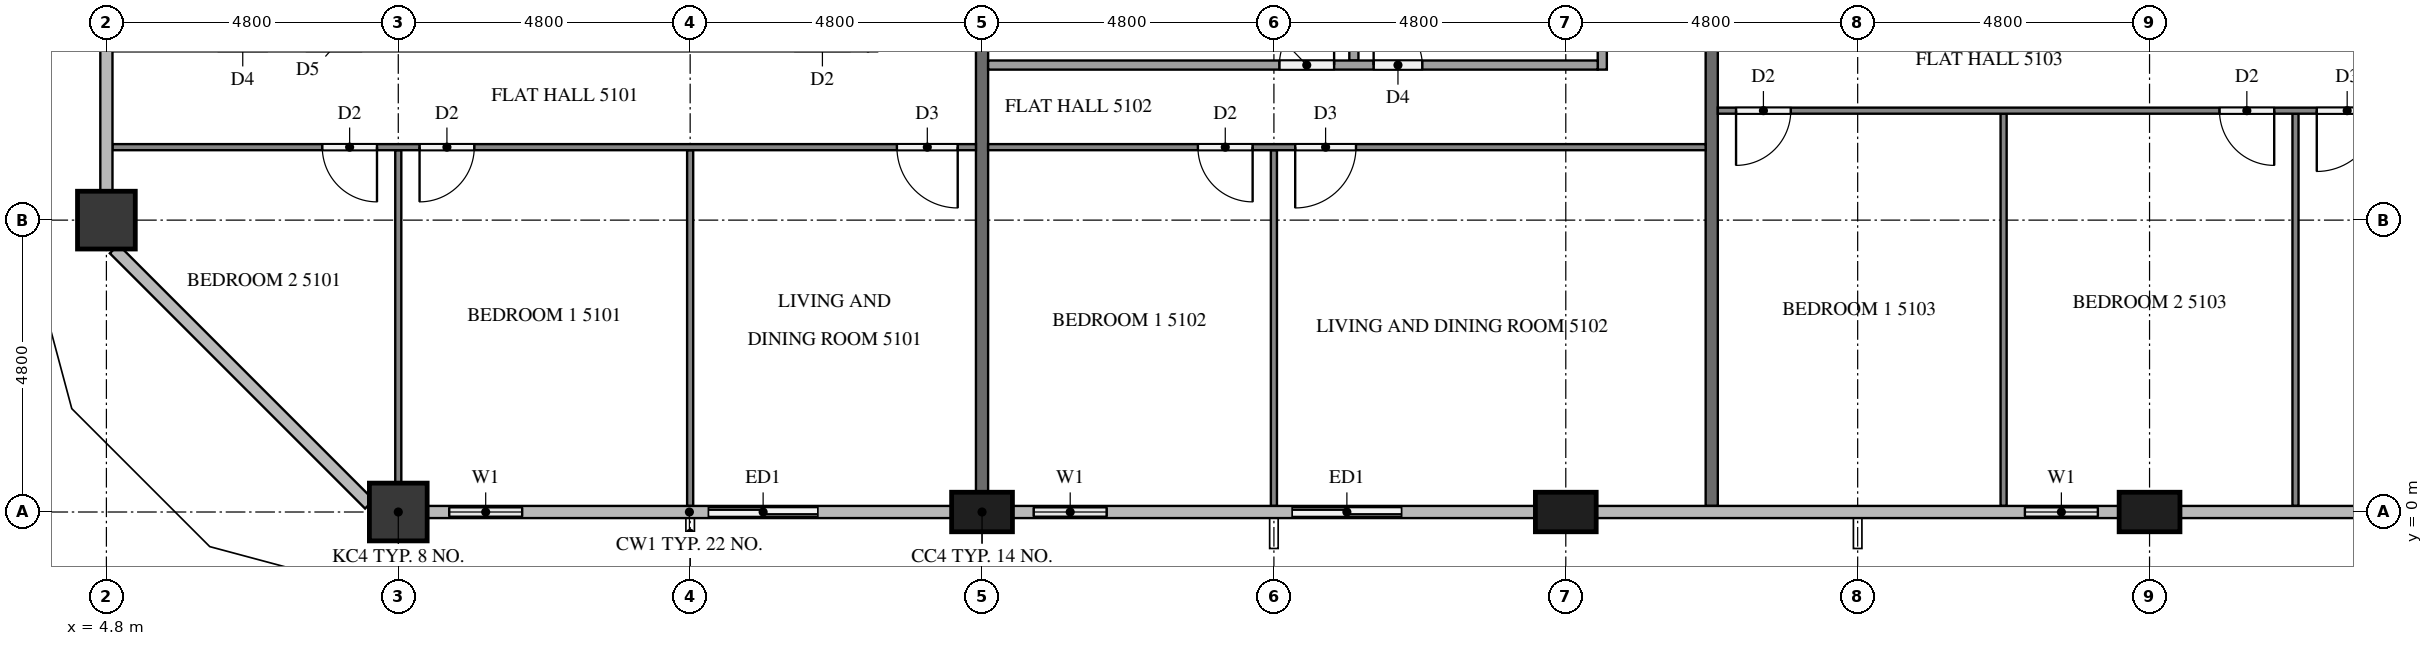
"""IFC4 building model, lengths in metres.
Left out: names, types, materials, properties, quantities, classifications, styles, units other than length and angle.
Written with IfcOpenShell. Run it as: python <this file> out.ifc"""

import sys

from ifc_helpers import new_model, si_unit, direction, frame, frame_2d, origin, origin_2d, place, context, subcontext, project, spatial, rectangle, extrude, element, fill, save


model = new_model("IFC4")
c1 = context("Model", 3, precision=1e-05, world=origin(), true_north=direction((0.0, 1.0)))
c2 = subcontext(c1, "Body", "Model", "MODEL_VIEW")
j1 = project(units=[si_unit("LENGTHUNIT", "METRE"), si_unit("PLANEANGLEUNIT", "RADIAN")], contexts=[c1])
p1 = place(None, origin())
s1 = spatial("IfcSite", under=j1, at=p1, CompositionType="ELEMENT")
p2 = place(p1, origin())
s2 = spatial("IfcBuilding", under=s1, at=p2, CompositionType="ELEMENT")
p3 = place(p2, frame((0.0, 0.0, 196.4)))
s3 = spatial("IfcBuildingStorey", under=s2, at=p3, CompositionType="ELEMENT", Elevation=196.4)
p4 = place(p3, frame((9.6, 0.0, 0.0), z_axis=(0.0, 0.0, 1.0), x_axis=(1.0, 0.0, 0.0)))
e1 = element("IfcColumn", 1, at=p4, inside=s3, PredefinedType="COLUMN", context=c2, shape_type="SweptSolid", body=[
    extrude(rectangle(XDim=0.95, YDim=0.95, at=origin_2d()), origin(), (0.0, 0.0, 1.0), 3.2),
])
for number, where, z_axis, x_axis in (
    (2, (19.2, 0.0, 0.0), (0.0, 0.0, 1.0), (1.0, 0.0, 0.0)),
    (3, (28.8, 0.0, 0.0), (0.0, 0.0, 1.0), (1.0, 0.0, 0.0)),
    (4, (38.4, 0.0, 0.0), (0.0, 0.0, 1.0), (1.0, 0.0, 0.0)),
):
    element("IfcColumn", number, at=place(p3, frame(where, z_axis=z_axis, x_axis=x_axis)), inside=s3, PredefinedType="COLUMN", context=c2, shape_type="SweptSolid", body=[
        extrude(rectangle(XDim=1.0, YDim=0.65, at=origin_2d()), origin(), (0.0, 0.0, 1.0), 3.2),
    ])
p5 = place(p3, frame((4.8, 4.8, 0.0), z_axis=(0.0, 0.0, 1.0), x_axis=(1.0, 0.0, 0.0)))
e5 = element("IfcColumn", 5, at=p5, inside=s3, PredefinedType="COLUMN", context=c2, shape_type="SweptSolid", body=[
    extrude(rectangle(XDim=0.95, YDim=0.95, at=origin_2d()), origin(), (0.0, 0.0, 1.0), 3.2),
])
p6 = place(p3, frame((10.075, 0.0, 0.0), z_axis=(0.0, 0.0, 1.0), x_axis=(1.0, 0.0, 0.0)))
e6 = element("IfcWall", 6, at=p6, inside=s3, PredefinedType="SOLIDWALL", context=c2, shape_type="SweptSolid", body=[
    extrude(rectangle(XDim=1.925, YDim=0.15, at=frame_2d((0.962, 0.0))), origin(), (0.0, 0.0, 1.0), 3.2),
])
p7 = place(p6, frame((0.363, 0.0, 0.9)))
e7 = element("IfcOpeningElement", 7, at=p7, cuts=e6, PredefinedType="OPENING", context=c2, shape_type="SweptSolid", body=[
    extrude(rectangle(XDim=1.2, YDim=1.4, at=frame_2d((0.6, 0.7))), frame((0.0, 0.085, 0.0), z_axis=(0.0, -1.0, 0.0), x_axis=(1.0, 0.0, 0.0)), (0.0, 0.0, 1.0), 0.17),
])
p8 = place(p3, frame((14.4, 0.0, 0.0), z_axis=(0.0, 0.0, 1.0), x_axis=(1.0, 0.0, 0.0)))
e8 = element("IfcWall", 8, at=p8, inside=s3, PredefinedType="SOLIDWALL", context=c2, shape_type="SweptSolid", body=[
    extrude(rectangle(XDim=2.4, YDim=0.15, at=frame_2d((1.2, 0.0))), origin(), (0.0, 0.0, 1.0), 3.2),
])
p9 = place(p8, frame((0.3, 0.0, 0.0)))
e9 = element("IfcOpeningElement", 9, at=p9, cuts=e8, PredefinedType="OPENING", context=c2, shape_type="SweptSolid", body=[
    extrude(rectangle(XDim=1.8, YDim=2.4, at=frame_2d((0.9, 1.2))), frame((0.0, 0.085, 0.0), z_axis=(0.0, -1.0, 0.0), x_axis=(1.0, 0.0, 0.0)), (0.0, 0.0, 1.0), 0.17),
])
p10 = place(p3, frame((19.7, 0.0, 0.0), z_axis=(0.0, 0.0, 1.0), x_axis=(1.0, 0.0, 0.0)))
e10 = element("IfcWall", 10, at=p10, inside=s3, PredefinedType="SOLIDWALL", context=c2, shape_type="SweptSolid", body=[
    extrude(rectangle(XDim=1.9, YDim=0.15, at=frame_2d((0.95, 0.0))), origin(), (0.0, 0.0, 1.0), 3.2),
])
p11 = place(p10, frame((0.35, 0.0, 0.9)))
e11 = element("IfcOpeningElement", 11, at=p11, cuts=e10, PredefinedType="OPENING", context=c2, shape_type="SweptSolid", body=[
    extrude(rectangle(XDim=1.2, YDim=1.4, at=frame_2d((0.6, 0.7))), frame((0.0, 0.085, 0.0), z_axis=(0.0, -1.0, 0.0), x_axis=(1.0, 0.0, 0.0)), (0.0, 0.0, 1.0), 0.17),
])
p12 = place(p3, frame((24.0, 0.0, 0.0), z_axis=(0.0, 0.0, 1.0), x_axis=(1.0, 0.0, 0.0)))
e12 = element("IfcWall", 12, at=p12, inside=s3, PredefinedType="SOLIDWALL", context=c2, shape_type="SweptSolid", body=[
    extrude(rectangle(XDim=2.4, YDim=0.15, at=frame_2d((1.2, 0.0))), origin(), (0.0, 0.0, 1.0), 3.2),
])
p13 = place(p12, frame((0.3, 0.0, 0.0)))
e13 = element("IfcOpeningElement", 13, at=p13, cuts=e12, PredefinedType="OPENING", context=c2, shape_type="SweptSolid", body=[
    extrude(rectangle(XDim=1.8, YDim=2.4, at=frame_2d((0.9, 1.2))), frame((0.0, 0.085, 0.0), z_axis=(0.0, -1.0, 0.0), x_axis=(1.0, 0.0, 0.0)), (0.0, 0.0, 1.0), 0.17),
])
p14 = place(p3, frame((36.0, 0.0, 0.0), z_axis=(0.0, 0.0, 1.0), x_axis=(1.0, 0.0, 0.0)))
e14 = element("IfcWall", 14, at=p14, inside=s3, PredefinedType="SOLIDWALL", context=c2, shape_type="SweptSolid", body=[
    extrude(rectangle(XDim=1.9, YDim=0.15, at=frame_2d((0.95, 0.0))), origin(), (0.0, 0.0, 1.0), 3.2),
])
p15 = place(p14, frame((0.35, 0.0, 0.9)))
e15 = element("IfcOpeningElement", 15, at=p15, cuts=e14, PredefinedType="OPENING", context=c2, shape_type="SweptSolid", body=[
    extrude(rectangle(XDim=1.2, YDim=1.4, at=frame_2d((0.6, 0.7))), frame((0.0, 0.085, 0.0), z_axis=(0.0, -1.0, 0.0), x_axis=(1.0, 0.0, 0.0)), (0.0, 0.0, 1.0), 0.17),
])
p16 = place(p3, frame((19.2, 11.9, 0.0), z_axis=(0.0, 0.0, 1.0), x_axis=(0.0, -1.0, 0.0)))
e16 = element("IfcWall", 16, at=p16, inside=s3, PredefinedType="PARTITIONING", context=c2, shape_type="SweptSolid", body=[
    extrude(rectangle(XDim=11.575, YDim=0.2, at=frame_2d((5.788, 0.0))), origin(), (0.0, 0.0, 1.0), 3.2),
])
p17 = place(p3, frame((31.2, 11.9, 0.0), z_axis=(0.0, 0.0, 1.0), x_axis=(0.0, -1.0, 0.0)))
e17 = element("IfcWall", 17, at=p17, inside=s3, PredefinedType="PARTITIONING", context=c2, shape_type="SweptSolid", body=[
    extrude(rectangle(XDim=11.8, YDim=0.2, at=frame_2d((5.9, 0.0))), origin(), (0.0, 0.0, 1.0), 3.2),
])
p18 = place(p3, frame((14.4, 5.95, 0.0), z_axis=(0.0, 0.0, 1.0), x_axis=(0.0, -1.0, 0.0)))
e18 = element("IfcWall", 18, at=p18, inside=s3, PredefinedType="PARTITIONING", context=c2, shape_type="SweptSolid", body=[
    extrude(rectangle(XDim=5.85, YDim=0.1, at=frame_2d((2.925, 0.0))), origin(), (0.0, 0.0, 1.0), 3.2),
])
p19 = place(p3, frame((9.6, 5.95, 0.0), z_axis=(0.0, 0.0, 1.0), x_axis=(0.0, -1.0, 0.0)))
e19 = element("IfcWall", 19, at=p19, inside=s3, PredefinedType="PARTITIONING", context=c2, shape_type="SweptSolid", body=[
    extrude(rectangle(XDim=5.475, YDim=0.1, at=frame_2d((2.737, 0.0))), origin(), (0.0, 0.0, 1.0), 3.2),
])
p20 = place(p3, frame((19.1, 6.0, 0.0), z_axis=(0.0, 0.0, 1.0), x_axis=(-1.0, 0.0, 0.0)))
e20 = element("IfcWall", 20, at=p20, inside=s3, PredefinedType="PARTITIONING", context=c2, shape_type="SweptSolid", body=[
    extrude(rectangle(XDim=14.2, YDim=0.1, at=frame_2d((7.1, 0.0))), origin(), (0.0, 0.0, 1.0), 3.2),
])
p21 = place(p20, frame((0.3, 0.0, 0.0)))
e21 = element("IfcOpeningElement", 21, at=p21, cuts=e20, PredefinedType="OPENING", context=c2, shape_type="SweptSolid", body=[
    extrude(rectangle(XDim=1.0, YDim=2.1, at=frame_2d((0.5, 1.05))), frame((0.0, 0.06, 0.0), z_axis=(0.0, -1.0, 0.0), x_axis=(1.0, 0.0, 0.0)), (0.0, 0.0, 1.0), 0.12),
])
p22 = place(p20, frame((8.25, 0.0, 0.0)))
e22 = element("IfcOpeningElement", 22, at=p22, cuts=e20, PredefinedType="OPENING", context=c2, shape_type="SweptSolid", body=[
    extrude(rectangle(XDim=0.9, YDim=2.1, at=frame_2d((0.45, 1.05))), frame((0.0, 0.06, 0.0), z_axis=(0.0, -1.0, 0.0), x_axis=(1.0, 0.0, 0.0)), (0.0, 0.0, 1.0), 0.12),
])
p23 = place(p20, frame((9.85, 0.0, 0.0)))
e23 = element("IfcOpeningElement", 23, at=p23, cuts=e20, PredefinedType="OPENING", context=c2, shape_type="SweptSolid", body=[
    extrude(rectangle(XDim=0.9, YDim=2.1, at=frame_2d((0.45, 1.05))), frame((0.0, 0.06, 0.0), z_axis=(0.0, -1.0, 0.0), x_axis=(1.0, 0.0, 0.0)), (0.0, 0.0, 1.0), 0.12),
])
p24 = place(p3, frame((24.0, 5.95, 0.0), z_axis=(0.0, 0.0, 1.0), x_axis=(0.0, -1.0, 0.0)))
e24 = element("IfcWall", 24, at=p24, inside=s3, PredefinedType="PARTITIONING", context=c2, shape_type="SweptSolid", body=[
    extrude(rectangle(XDim=5.85, YDim=0.1, at=frame_2d((2.925, 0.0))), origin(), (0.0, 0.0, 1.0), 3.2),
])
p25 = place(p3, frame((31.1, 6.0, 0.0), z_axis=(0.0, 0.0, 1.0), x_axis=(-1.0, 0.0, 0.0)))
e25 = element("IfcWall", 25, at=p25, inside=s3, PredefinedType="PARTITIONING", context=c2, shape_type="SweptSolid", body=[
    extrude(rectangle(XDim=11.8, YDim=0.1, at=frame_2d((5.9, 0.0))), origin(), (0.0, 0.0, 1.0), 3.2),
])
p26 = place(p25, frame((5.75, 0.0, 0.0)))
e26 = element("IfcOpeningElement", 26, at=p26, cuts=e25, PredefinedType="OPENING", context=c2, shape_type="SweptSolid", body=[
    extrude(rectangle(XDim=1.0, YDim=2.1, at=frame_2d((0.5, 1.05))), frame((0.0, 0.06, 0.0), z_axis=(0.0, -1.0, 0.0), x_axis=(1.0, 0.0, 0.0)), (0.0, 0.0, 1.0), 0.12),
])
p27 = place(p25, frame((7.45, 0.0, 0.0)))
e27 = element("IfcOpeningElement", 27, at=p27, cuts=e25, PredefinedType="OPENING", context=c2, shape_type="SweptSolid", body=[
    extrude(rectangle(XDim=0.9, YDim=2.1, at=frame_2d((0.45, 1.05))), frame((0.0, 0.06, 0.0), z_axis=(0.0, -1.0, 0.0), x_axis=(1.0, 0.0, 0.0)), (0.0, 0.0, 1.0), 0.12),
])
p28 = place(p3, frame((25.315, 11.9, 0.0), z_axis=(0.0, 0.0, 1.0), x_axis=(0.0, -1.0, 0.0)))
e28 = element("IfcWall", 28, at=p28, inside=s3, PredefinedType="PARTITIONING", context=c2, shape_type="SweptSolid", body=[
    extrude(rectangle(XDim=4.475, YDim=0.15, at=frame_2d((2.237, 0.0))), origin(), (0.0, 0.0, 1.0), 3.2),
])
p29 = place(p3, frame((29.4, 11.9, 0.0), z_axis=(0.0, 0.0, 1.0), x_axis=(0.0, -1.0, 0.0)))
e29 = element("IfcWall", 29, at=p29, inside=s3, PredefinedType="PARTITIONING", context=c2, shape_type="SweptSolid", body=[
    extrude(rectangle(XDim=4.625, YDim=0.15, at=frame_2d((2.312, 0.0))), origin(), (0.0, 0.0, 1.0), 3.2),
])
p30 = place(p3, frame((19.3, 7.35, 0.0), z_axis=(0.0, 0.0, 1.0), x_axis=(1.0, 0.0, 0.0)))
e30 = element("IfcWall", 30, at=p30, inside=s3, PredefinedType="PARTITIONING", context=c2, shape_type="SweptSolid", body=[
    extrude(rectangle(XDim=10.025, YDim=0.15, at=frame_2d((5.012, 0.0))), origin(), (0.0, 0.0, 1.0), 3.2),
])
p31 = place(p30, frame((6.34, 0.0, 0.0)))
e31 = element("IfcOpeningElement", 31, at=p31, cuts=e30, PredefinedType="OPENING", context=c2, shape_type="SweptSolid", body=[
    extrude(rectangle(XDim=0.8, YDim=2.1, at=frame_2d((0.4, 1.05))), frame((0.0, 0.085, 0.0), z_axis=(0.0, -1.0, 0.0), x_axis=(1.0, 0.0, 0.0)), (0.0, 0.0, 1.0), 0.17),
])
p32 = place(p30, frame((4.79, 0.0, 0.0)))
e32 = element("IfcOpeningElement", 32, at=p32, cuts=e30, PredefinedType="OPENING", context=c2, shape_type="SweptSolid", body=[
    extrude(rectangle(XDim=0.9, YDim=2.1, at=frame_2d((0.45, 1.05))), frame((0.0, 0.085, 0.0), z_axis=(0.0, -1.0, 0.0), x_axis=(1.0, 0.0, 0.0)), (0.0, 0.0, 1.0), 0.17),
])
for number, where, z_axis, x_axis in (
    (33, (36.0, 6.55, 0.0), (0.0, 0.0, 1.0), (0.0, -1.0, 0.0)),
    (34, (40.8, 6.55, 0.0), (0.0, 0.0, 1.0), (0.0, -1.0, 0.0)),
):
    element("IfcWall", number, at=place(p3, frame(where, z_axis=z_axis, x_axis=x_axis)), inside=s3, PredefinedType="PARTITIONING", context=c2, shape_type="SweptSolid", body=[
        extrude(rectangle(XDim=6.45, YDim=0.1, at=frame_2d((3.225, 0.0))), origin(), (0.0, 0.0, 1.0), 3.2),
    ])
p33 = place(p3, frame((45.5, 6.6, 0.0), z_axis=(0.0, 0.0, 1.0), x_axis=(-1.0, 0.0, 0.0)))
e35 = element("IfcWall", 35, at=p33, inside=s3, PredefinedType="PARTITIONING", context=c2, shape_type="SweptSolid", body=[
    extrude(rectangle(XDim=14.2, YDim=0.1, at=frame_2d((7.1, 0.0))), origin(), (0.0, 0.0, 1.0), 3.2),
])
p34 = place(p33, frame((13.0, 0.0, 0.0)))
e36 = element("IfcOpeningElement", 36, at=p34, cuts=e35, PredefinedType="OPENING", context=c2, shape_type="SweptSolid", body=[
    extrude(rectangle(XDim=0.9, YDim=2.1, at=frame_2d((0.45, 1.05))), frame((0.0, 0.06, 0.0), z_axis=(0.0, -1.0, 0.0), x_axis=(1.0, 0.0, 0.0)), (0.0, 0.0, 1.0), 0.12),
])
p35 = place(p33, frame((5.05, 0.0, 0.0)))
e37 = element("IfcOpeningElement", 37, at=p35, cuts=e35, PredefinedType="OPENING", context=c2, shape_type="SweptSolid", body=[
    extrude(rectangle(XDim=0.9, YDim=2.1, at=frame_2d((0.45, 1.05))), frame((0.0, 0.06, 0.0), z_axis=(0.0, -1.0, 0.0), x_axis=(1.0, 0.0, 0.0)), (0.0, 0.0, 1.0), 0.12),
])
p36 = place(p33, frame((3.35, 0.0, 0.0)))
e38 = element("IfcOpeningElement", 38, at=p36, cuts=e35, PredefinedType="OPENING", context=c2, shape_type="SweptSolid", body=[
    extrude(rectangle(XDim=1.0, YDim=2.1, at=frame_2d((0.5, 1.05))), frame((0.0, 0.06, 0.0), z_axis=(0.0, -1.0, 0.0), x_axis=(1.0, 0.0, 0.0)), (0.0, 0.0, 1.0), 0.12),
])
p37 = place(p7, origin())
e39 = element("IfcWindow", 39, at=p37, inside=s3, PartitioningType="SINGLE_PANEL", PredefinedType="WINDOW", context=c2, shape_type="SweptSolid", body=[
    extrude(rectangle(XDim=1.2, YDim=1.4, at=frame_2d((0.6, 0.7))), frame((0.0, 0.03, 0.0), z_axis=(0.0, -1.0, 0.0), x_axis=(1.0, 0.0, 0.0)), (0.0, 0.0, 1.0), 0.06),
])
fill(e7, e39)
p38 = place(p9, origin())
e40 = element("IfcDoor", 40, at=p38, inside=s3, OperationType="SLIDING_TO_LEFT", PredefinedType="DOOR", context=c2, shape_type="SweptSolid", body=[
    extrude(rectangle(XDim=1.8, YDim=2.4, at=frame_2d((0.9, 1.2))), frame((0.0, 0.025, 0.0), z_axis=(0.0, -1.0, 0.0), x_axis=(1.0, 0.0, 0.0)), (0.0, 0.0, 1.0), 0.05),
])
fill(e9, e40)
p39 = place(p11, origin())
e41 = element("IfcWindow", 41, at=p39, inside=s3, PartitioningType="SINGLE_PANEL", PredefinedType="WINDOW", context=c2, shape_type="SweptSolid", body=[
    extrude(rectangle(XDim=1.2, YDim=1.4, at=frame_2d((0.6, 0.7))), frame((0.0, 0.03, 0.0), z_axis=(0.0, -1.0, 0.0), x_axis=(1.0, 0.0, 0.0)), (0.0, 0.0, 1.0), 0.06),
])
fill(e11, e41)
p40 = place(p13, origin())
e42 = element("IfcDoor", 42, at=p40, inside=s3, OperationType="SLIDING_TO_RIGHT", PredefinedType="DOOR", context=c2, shape_type="SweptSolid", body=[
    extrude(rectangle(XDim=1.8, YDim=2.4, at=frame_2d((0.9, 1.2))), frame((0.0, 0.025, 0.0), z_axis=(0.0, -1.0, 0.0), x_axis=(1.0, 0.0, 0.0)), (0.0, 0.0, 1.0), 0.05),
])
fill(e13, e42)
p41 = place(p15, origin())
e43 = element("IfcWindow", 43, at=p41, inside=s3, PartitioningType="SINGLE_PANEL", PredefinedType="WINDOW", context=c2, shape_type="SweptSolid", body=[
    extrude(rectangle(XDim=1.2, YDim=1.4, at=frame_2d((0.6, 0.7))), frame((0.0, 0.03, 0.0), z_axis=(0.0, -1.0, 0.0), x_axis=(1.0, 0.0, 0.0)), (0.0, 0.0, 1.0), 0.06),
])
fill(e15, e43)
p42 = place(p21, origin())
e44 = element("IfcDoor", 44, at=p42, inside=s3, OperationType="SINGLE_SWING_LEFT", PredefinedType="DOOR", context=c2, shape_type="SweptSolid", body=[
    extrude(rectangle(XDim=1.0, YDim=2.1, at=frame_2d((0.5, 1.05))), frame((0.0, 0.025, 0.0), z_axis=(0.0, -1.0, 0.0), x_axis=(1.0, 0.0, 0.0)), (0.0, 0.0, 1.0), 0.05),
])
fill(e21, e44)
p43 = place(p22, origin())
e45 = element("IfcDoor", 45, at=p43, inside=s3, OperationType="SINGLE_SWING_RIGHT", PredefinedType="DOOR", context=c2, shape_type="SweptSolid", body=[
    extrude(rectangle(XDim=0.9, YDim=2.1, at=frame_2d((0.45, 1.05))), frame((0.0, 0.025, 0.0), z_axis=(0.0, -1.0, 0.0), x_axis=(1.0, 0.0, 0.0)), (0.0, 0.0, 1.0), 0.05),
])
fill(e22, e45)
p44 = place(p23, origin())
e46 = element("IfcDoor", 46, at=p44, inside=s3, OperationType="SINGLE_SWING_LEFT", PredefinedType="DOOR", context=c2, shape_type="SweptSolid", body=[
    extrude(rectangle(XDim=0.9, YDim=2.1, at=frame_2d((0.45, 1.05))), frame((0.0, 0.025, 0.0), z_axis=(0.0, -1.0, 0.0), x_axis=(1.0, 0.0, 0.0)), (0.0, 0.0, 1.0), 0.05),
])
fill(e23, e46)
p45 = place(p26, origin())
e47 = element("IfcDoor", 47, at=p45, inside=s3, OperationType="SINGLE_SWING_RIGHT", PredefinedType="DOOR", context=c2, shape_type="SweptSolid", body=[
    extrude(rectangle(XDim=1.0, YDim=2.1, at=frame_2d((0.5, 1.05))), frame((0.0, 0.025, 0.0), z_axis=(0.0, -1.0, 0.0), x_axis=(1.0, 0.0, 0.0)), (0.0, 0.0, 1.0), 0.05),
])
fill(e26, e47)
p46 = place(p27, origin())
e48 = element("IfcDoor", 48, at=p46, inside=s3, OperationType="SINGLE_SWING_LEFT", PredefinedType="DOOR", context=c2, shape_type="SweptSolid", body=[
    extrude(rectangle(XDim=0.9, YDim=2.1, at=frame_2d((0.45, 1.05))), frame((0.0, 0.025, 0.0), z_axis=(0.0, -1.0, 0.0), x_axis=(1.0, 0.0, 0.0)), (0.0, 0.0, 1.0), 0.05),
])
fill(e27, e48)
p47 = place(p31, origin())
e49 = element("IfcDoor", 49, at=p47, inside=s3, OperationType="SINGLE_SWING_LEFT", PredefinedType="DOOR", context=c2, shape_type="SweptSolid", body=[
    extrude(rectangle(XDim=0.8, YDim=2.1, at=frame_2d((0.4, 1.05))), frame((0.0, 0.025, 0.0), z_axis=(0.0, -1.0, 0.0), x_axis=(1.0, 0.0, 0.0)), (0.0, 0.0, 1.0), 0.05),
])
fill(e31, e49)
p48 = place(p32, origin())
e50 = element("IfcDoor", 50, at=p48, inside=s3, OperationType="SINGLE_SWING_RIGHT", PredefinedType="DOOR", context=c2, shape_type="SweptSolid", body=[
    extrude(rectangle(XDim=0.9, YDim=2.1, at=frame_2d((0.45, 1.05))), frame((0.0, 0.025, 0.0), z_axis=(0.0, -1.0, 0.0), x_axis=(1.0, 0.0, 0.0)), (0.0, 0.0, 1.0), 0.05),
])
fill(e32, e50)
p49 = place(p34, origin())
e51 = element("IfcDoor", 51, at=p49, inside=s3, OperationType="SINGLE_SWING_RIGHT", PredefinedType="DOOR", context=c2, shape_type="SweptSolid", body=[
    extrude(rectangle(XDim=0.9, YDim=2.1, at=frame_2d((0.45, 1.05))), frame((0.0, 0.025, 0.0), z_axis=(0.0, -1.0, 0.0), x_axis=(1.0, 0.0, 0.0)), (0.0, 0.0, 1.0), 0.05),
])
fill(e36, e51)
p50 = place(p35, origin())
e52 = element("IfcDoor", 52, at=p50, inside=s3, OperationType="SINGLE_SWING_LEFT", PredefinedType="DOOR", context=c2, shape_type="SweptSolid", body=[
    extrude(rectangle(XDim=0.9, YDim=2.1, at=frame_2d((0.45, 1.05))), frame((0.0, 0.025, 0.0), z_axis=(0.0, -1.0, 0.0), x_axis=(1.0, 0.0, 0.0)), (0.0, 0.0, 1.0), 0.05),
])
fill(e37, e52)
p51 = place(p36, origin())
e53 = element("IfcDoor", 53, at=p51, inside=s3, OperationType="SINGLE_SWING_RIGHT", PredefinedType="DOOR", context=c2, shape_type="SweptSolid", body=[
    extrude(rectangle(XDim=1.0, YDim=2.1, at=frame_2d((0.5, 1.05))), frame((0.0, 0.025, 0.0), z_axis=(0.0, -1.0, 0.0), x_axis=(1.0, 0.0, 0.0)), (0.0, 0.0, 1.0), 0.05),
])
fill(e38, e53)
save(model, sys.argv[1])
